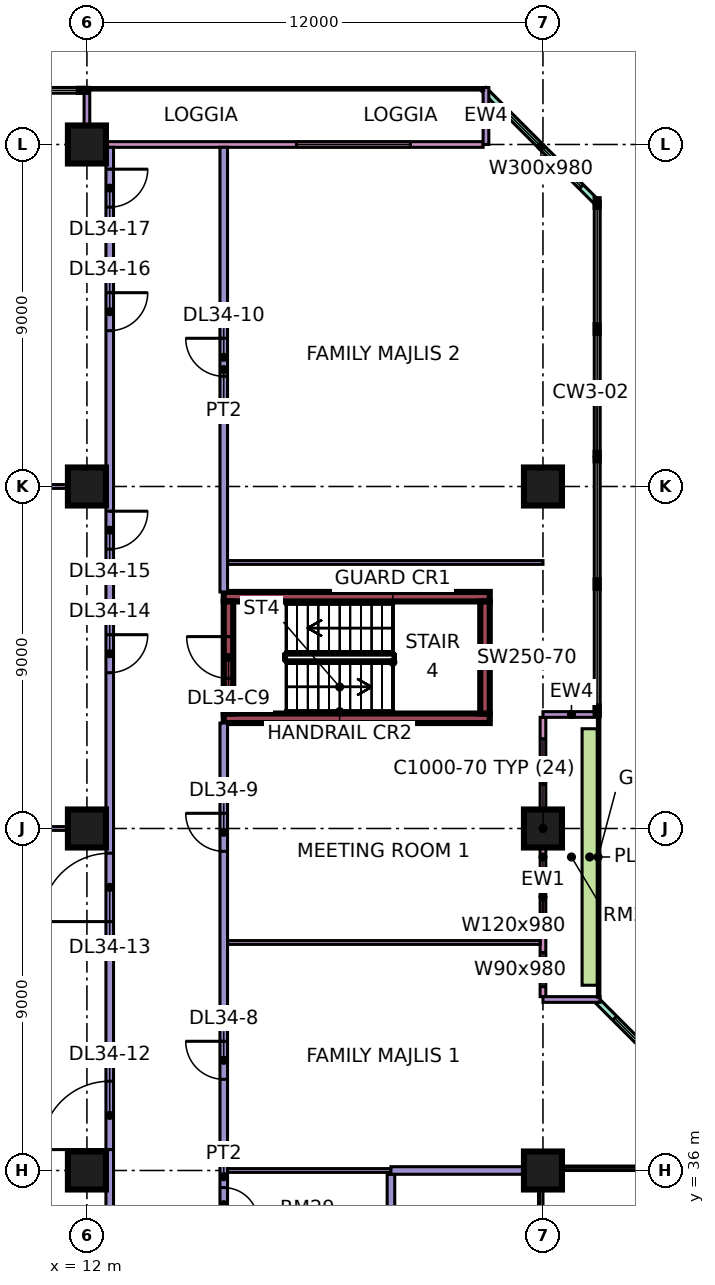
"""IFC4 building model, lengths in metres.
Left out: names, types, materials, properties, quantities, classifications, styles, units other than length and angle.
Written with IfcOpenShell. Run it as: python <this file> out.ifc"""

import sys

from ifc_helpers import new_model, si_unit, direction, frame, frame_2d, origin, origin_2d, place, context, subcontext, project, spatial, rectangle, extrude, element, fill, save


model = new_model("IFC4")
c1 = context("Model", 3, precision=1e-05, world=origin(), true_north=direction((0.0, 1.0)))
c2 = subcontext(c1, "Body", "Model", "MODEL_VIEW")
j1 = project(units=[si_unit("LENGTHUNIT", "METRE"), si_unit("PLANEANGLEUNIT", "RADIAN")], contexts=[c1])
p1 = place(None, origin())
s1 = spatial("IfcSite", under=j1, at=p1, CompositionType="ELEMENT")
p2 = place(p1, origin())
s2 = spatial("IfcBuilding", under=s1, at=p2, CompositionType="ELEMENT")
p3 = place(p2, frame((0.0, 0.0, 146.15)))
s3 = spatial("IfcBuildingStorey", under=s2, at=p3, CompositionType="ELEMENT", Elevation=146.15)
for number, where, z_axis, x_axis in (
    (1, (12.0, 36.0, 0.0), (0.0, 0.0, 1.0), (1.0, 0.0, 0.0)),
    (2, (12.0, 45.0, 0.0), (0.0, 0.0, 1.0), (1.0, 0.0, 0.0)),
    (3, (12.0, 54.0, 0.0), (0.0, 0.0, 1.0), (1.0, 0.0, 0.0)),
    (4, (12.0, 63.0, 0.0), (0.0, 0.0, 1.0), (1.0, 0.0, 0.0)),
    (5, (24.0, 36.0, 0.0), (0.0, 0.0, 1.0), (1.0, 0.0, 0.0)),
    (6, (24.0, 45.0, 0.0), (0.0, 0.0, 1.0), (1.0, 0.0, 0.0)),
    (7, (24.0, 54.0, 0.0), (0.0, 0.0, 1.0), (1.0, 0.0, 0.0)),
):
    element("IfcColumn", number, at=place(p3, frame(where, z_axis=z_axis, x_axis=x_axis)), inside=s3, PredefinedType="COLUMN", context=c2, shape_type="SweptSolid", body=[
        extrude(rectangle(XDim=1.0, YDim=1.0, at=origin_2d()), origin(), (0.0, 0.0, 1.0), 11.25),
    ])
for number, where, z_axis, x_axis in (
    (8, (15.6, 47.9, 0.0), (0.0, 0.0, 1.0), (1.0, 0.0, 0.0)),
    (9, (15.6, 51.1, 0.0), (0.0, 0.0, 1.0), (1.0, 0.0, 0.0)),
):
    element("IfcWall", number, at=place(p3, frame(where, z_axis=z_axis, x_axis=x_axis)), inside=s3, PredefinedType="SHEAR", context=c2, shape_type="SweptSolid", body=[
        extrude(rectangle(XDim=7.0, YDim=0.25, at=frame_2d((3.5, 0.0))), origin(), (0.0, 0.0, 1.0), 11.25),
    ])
p4 = place(p3, frame((15.725, 48.025, 0.0), z_axis=(0.0, 0.0, 1.0), x_axis=(0.0, 1.0, 0.0)))
e10 = element("IfcWall", 10, at=p4, inside=s3, PredefinedType="SHEAR", context=c2, shape_type="SweptSolid", body=[
    extrude(rectangle(XDim=2.95, YDim=0.25, at=frame_2d((1.475, 0.0))), origin(), (0.0, 0.0, 1.0), 11.25),
])
p5 = place(p4, frame((0.925, 0.0, 0.0)))
e11 = element("IfcOpeningElement", 11, at=p5, cuts=e10, PredefinedType="OPENING", context=c2, shape_type="SweptSolid", body=[
    extrude(rectangle(XDim=1.1, YDim=2.2, at=frame_2d((0.55, 1.1))), frame((0.0, 0.135, 0.0), z_axis=(0.0, -1.0, 0.0), x_axis=(1.0, 0.0, 0.0)), (0.0, 0.0, 1.0), 0.27),
])
p6 = place(p3, frame((22.475, 48.025, 0.0), z_axis=(0.0, 0.0, 1.0), x_axis=(0.0, 1.0, 0.0)))
e12 = element("IfcWall", 12, at=p6, inside=s3, PredefinedType="SHEAR", context=c2, shape_type="SweptSolid", body=[
    extrude(rectangle(XDim=2.95, YDim=0.25, at=frame_2d((1.475, 0.0))), origin(), (0.0, 0.0, 1.0), 11.25),
])
p7 = place(p3, frame((28.447, 37.447, 0.0), z_axis=(0.0, 0.0, 1.0), x_axis=(-0.707106781187, 0.707106781187, 0.0)))
e13 = element("IfcWall", 13, at=p7, inside=s3, PredefinedType="SOLIDWALL", context=c2, shape_type="SweptSolid", body=[
    extrude(rectangle(XDim=4.243, YDim=0.15, at=frame_2d((2.121, 0.0))), origin(), (0.0, 0.0, 1.0), 10.85),
])
p8 = place(p7, frame((0.621, 0.0, 0.45)))
e14 = element("IfcOpeningElement", 14, at=p8, cuts=e13, PredefinedType="OPENING", context=c2, shape_type="SweptSolid", body=[
    extrude(rectangle(XDim=3.0, YDim=9.8, at=frame_2d((1.5, 4.9))), frame((0.0, 0.085, 0.0), z_axis=(0.0, -1.0, 0.0), x_axis=(1.0, 0.0, 0.0)), (0.0, 0.0, 1.0), 0.17),
])
p9 = place(p3, frame((24.0, 40.575, 0.0), z_axis=(0.0, 0.0, 1.0), x_axis=(0.0, 1.0, 0.0)))
e15 = element("IfcWall", 15, at=p9, inside=s3, PredefinedType="SOLIDWALL", context=c2, shape_type="SweptSolid", body=[
    extrude(rectangle(XDim=7.35, YDim=0.15, at=frame_2d((3.675, 0.0))), origin(), (0.0, 0.0, 1.0), 10.85),
])
p10 = place(p9, frame((0.262, 0.0, 0.45)))
e16 = element("IfcOpeningElement", 16, at=p10, cuts=e15, PredefinedType="OPENING", context=c2, shape_type="SweptSolid", body=[
    extrude(rectangle(XDim=0.9, YDim=9.8, at=frame_2d((0.45, 4.9))), frame((0.0, 0.085, 0.0), z_axis=(0.0, -1.0, 0.0), x_axis=(1.0, 0.0, 0.0)), (0.0, 0.0, 1.0), 0.17),
])
p11 = place(p9, frame((2.025, 0.0, 0.45)))
e17 = element("IfcOpeningElement", 17, at=p11, cuts=e15, PredefinedType="OPENING", context=c2, shape_type="SweptSolid", body=[
    extrude(rectangle(XDim=1.2, YDim=9.8, at=frame_2d((0.6, 4.9))), frame((0.0, 0.085, 0.0), z_axis=(0.0, -1.0, 0.0), x_axis=(1.0, 0.0, 0.0)), (0.0, 0.0, 1.0), 0.17),
])
p12 = place(p9, frame((5.587, 0.0, 0.45)))
e18 = element("IfcOpeningElement", 18, at=p12, cuts=e15, PredefinedType="OPENING", context=c2, shape_type="SweptSolid", body=[
    extrude(rectangle(XDim=1.2, YDim=9.8, at=frame_2d((0.6, 4.9))), frame((0.0, 0.085, 0.0), z_axis=(0.0, -1.0, 0.0), x_axis=(1.0, 0.0, 0.0)), (0.0, 0.0, 1.0), 0.17),
])
for number, where, z_axis, x_axis in (
    (19, (25.5, 40.5, 0.0), (0.0, 0.0, 1.0), (-1.0, 0.0, 0.0)),
    (20, (25.5, 48.0, 0.0), (0.0, 0.0, 1.0), (-1.0, 0.0, 0.0)),
):
    element("IfcWall", number, at=place(p3, frame(where, z_axis=z_axis, x_axis=x_axis)), inside=s3, PredefinedType="SOLIDWALL", context=c2, shape_type="SweptSolid", body=[
        extrude(rectangle(XDim=1.5, YDim=0.15, at=frame_2d((0.75, 0.0))), origin(), (0.0, 0.0, 1.0), 10.85),
    ])
p13 = place(p3, frame((25.447, 61.447, 0.0), z_axis=(0.0, 0.0, 1.0), x_axis=(-0.707106781187, 0.707106781187, 0.0)))
e21 = element("IfcWall", 21, at=p13, inside=s3, PredefinedType="SOLIDWALL", context=c2, shape_type="SweptSolid", body=[
    extrude(rectangle(XDim=4.243, YDim=0.15, at=frame_2d((2.121, 0.0))), origin(), (0.0, 0.0, 1.0), 10.85),
])
p14 = place(p13, frame((0.621, 0.0, 0.45)))
e22 = element("IfcOpeningElement", 22, at=p14, cuts=e21, PredefinedType="OPENING", context=c2, shape_type="SweptSolid", body=[
    extrude(rectangle(XDim=3.0, YDim=9.8, at=frame_2d((1.5, 4.9))), frame((0.0, 0.085, 0.0), z_axis=(0.0, -1.0, 0.0), x_axis=(1.0, 0.0, 0.0)), (0.0, 0.0, 1.0), 0.17),
])
p15 = place(p3, frame((22.425, 63.0, 0.0), z_axis=(0.0, 0.0, 1.0), x_axis=(-1.0, 0.0, 0.0)))
e23 = element("IfcWall", 23, at=p15, inside=s3, PredefinedType="SOLIDWALL", context=c2, shape_type="SweptSolid", body=[
    extrude(rectangle(XDim=10.35, YDim=0.15, at=frame_2d((5.175, 0.0))), origin(), (0.0, 0.0, 1.0), 10.85),
])
p16 = place(p15, frame((1.913, 0.0, 0.45)))
e24 = element("IfcOpeningElement", 24, at=p16, cuts=e23, PredefinedType="OPENING", context=c2, shape_type="SweptSolid", body=[
    extrude(rectangle(XDim=3.0, YDim=9.8, at=frame_2d((1.5, 4.9))), frame((0.0, 0.085, 0.0), z_axis=(0.0, -1.0, 0.0), x_axis=(1.0, 0.0, 0.0)), (0.0, 0.0, 1.0), 0.17),
])
for number, where, z_axis, x_axis in (
    (25, (22.5, 64.5, 0.0), (0.0, 0.0, 1.0), (0.0, -1.0, 0.0)),
    (26, (12.0, 64.5, 0.0), (0.0, 0.0, 1.0), (0.0, -1.0, 0.0)),
):
    element("IfcWall", number, at=place(p3, frame(where, z_axis=z_axis, x_axis=x_axis)), inside=s3, PredefinedType="SOLIDWALL", context=c2, shape_type="SweptSolid", body=[
        extrude(rectangle(XDim=1.5, YDim=0.15, at=frame_2d((0.75, 0.0))), origin(), (0.0, 0.0, 1.0), 10.85),
    ])
p17 = place(p3, frame((25.229, 40.875, 0.0), z_axis=(0.0, 0.0, 1.0), x_axis=(0.0, 1.0, 0.0)))
e27 = element("IfcWall", 27, at=p17, inside=s3, PredefinedType="SOLIDWALL", context=c2, shape_type="SweptSolid", body=[
    extrude(rectangle(XDim=6.75, YDim=0.4, at=frame_2d((3.375, 0.0))), origin(), (0.0, 0.0, 1.0), 0.7),
])
p18 = place(p3, frame((0.0, 54.0, 0.0), z_axis=(0.0, 0.0, 1.0), x_axis=(1.0, 0.0, 0.0)))
e28 = element("IfcWall", 28, at=p18, inside=s3, PredefinedType="PARTITIONING", context=c2, shape_type="SweptSolid", body=[
    extrude(rectangle(XDim=12.5, YDim=0.1, at=frame_2d((6.25, 0.0))), origin(), (0.0, 0.0, 1.0), 10.85),
])
p19 = place(p3, frame((0.074, 45.0, 0.0), z_axis=(0.0, 0.0, 1.0), x_axis=(1.0, 0.0, 0.0)))
e29 = element("IfcWall", 29, at=p19, inside=s3, PredefinedType="PARTITIONING", context=c2, shape_type="SweptSolid", body=[
    extrude(rectangle(XDim=12.426, YDim=0.1, at=frame_2d((6.213, 0.0))), origin(), (0.0, 0.0, 1.0), 10.85),
])
p20 = place(p3, frame((12.6, 22.9, 0.0), z_axis=(0.0, 0.0, 1.0), x_axis=(0.0, 1.0, 0.0)))
e30 = element("IfcWall", 30, at=p20, inside=s3, PredefinedType="PARTITIONING", context=c2, shape_type="SweptSolid", body=[
    extrude(rectangle(XDim=40.026, YDim=0.2, at=frame_2d((20.013, 0.0))), origin(), (0.0, 0.0, 1.0), 10.85),
])
p21 = place(p20, frame((13.65, 0.0, 0.0)))
e31 = element("IfcOpeningElement", 31, at=p21, cuts=e30, PredefinedType="OPENING", context=c2, shape_type="SweptSolid", body=[
    extrude(rectangle(XDim=1.8, YDim=2.1, at=frame_2d((0.9, 1.05))), frame((0.0, 0.11, 0.0), z_axis=(0.0, -1.0, 0.0), x_axis=(1.0, 0.0, 0.0)), (0.0, 0.0, 1.0), 0.22),
])
p22 = place(p20, frame((19.65, 0.0, 0.0)))
e32 = element("IfcOpeningElement", 32, at=p22, cuts=e30, PredefinedType="OPENING", context=c2, shape_type="SweptSolid", body=[
    extrude(rectangle(XDim=1.8, YDim=2.1, at=frame_2d((0.9, 1.05))), frame((0.0, 0.11, 0.0), z_axis=(0.0, -1.0, 0.0), x_axis=(1.0, 0.0, 0.0)), (0.0, 0.0, 1.0), 0.22),
])
p23 = place(p20, frame((26.2, 0.0, 0.0)))
e33 = element("IfcOpeningElement", 33, at=p23, cuts=e30, PredefinedType="OPENING", context=c2, shape_type="SweptSolid", body=[
    extrude(rectangle(XDim=1.0, YDim=2.1, at=frame_2d((0.5, 1.05))), frame((0.0, 0.11, 0.0), z_axis=(0.0, -1.0, 0.0), x_axis=(1.0, 0.0, 0.0)), (0.0, 0.0, 1.0), 0.22),
])
p24 = place(p20, frame((29.45, 0.0, 0.0)))
e34 = element("IfcOpeningElement", 34, at=p24, cuts=e30, PredefinedType="OPENING", context=c2, shape_type="SweptSolid", body=[
    extrude(rectangle(XDim=1.0, YDim=2.1, at=frame_2d((0.5, 1.05))), frame((0.0, 0.11, 0.0), z_axis=(0.0, -1.0, 0.0), x_axis=(1.0, 0.0, 0.0)), (0.0, 0.0, 1.0), 0.22),
])
p25 = place(p20, frame((35.2, 0.0, 0.0)))
e35 = element("IfcOpeningElement", 35, at=p25, cuts=e30, PredefinedType="OPENING", context=c2, shape_type="SweptSolid", body=[
    extrude(rectangle(XDim=1.0, YDim=2.1, at=frame_2d((0.5, 1.05))), frame((0.0, 0.11, 0.0), z_axis=(0.0, -1.0, 0.0), x_axis=(1.0, 0.0, 0.0)), (0.0, 0.0, 1.0), 0.22),
])
p26 = place(p20, frame((38.45, 0.0, 0.0)))
e36 = element("IfcOpeningElement", 36, at=p26, cuts=e30, PredefinedType="OPENING", context=c2, shape_type="SweptSolid", body=[
    extrude(rectangle(XDim=1.0, YDim=2.1, at=frame_2d((0.5, 1.05))), frame((0.0, 0.11, 0.0), z_axis=(0.0, -1.0, 0.0), x_axis=(1.0, 0.0, 0.0)), (0.0, 0.0, 1.0), 0.22),
])
p27 = place(p3, frame((15.6, 23.9, 0.0), z_axis=(0.0, 0.0, 1.0), x_axis=(0.0, 1.0, 0.0)))
e37 = element("IfcWall", 37, at=p27, inside=s3, PredefinedType="PARTITIONING", context=c2, shape_type="SweptSolid", body=[
    extrude(rectangle(XDim=23.875, YDim=0.2, at=frame_2d((11.938, 0.0))), origin(), (0.0, 0.0, 1.0), 10.85),
])
p28 = place(p27, frame((14.5, 0.0, 0.0)))
e38 = element("IfcOpeningElement", 38, at=p28, cuts=e37, PredefinedType="OPENING", context=c2, shape_type="SweptSolid", body=[
    extrude(rectangle(XDim=1.0, YDim=2.1, at=frame_2d((0.5, 1.05))), frame((0.0, 0.11, 0.0), z_axis=(0.0, -1.0, 0.0), x_axis=(1.0, 0.0, 0.0)), (0.0, 0.0, 1.0), 0.22),
])
p29 = place(p27, frame((20.5, 0.0, 0.0)))
e39 = element("IfcOpeningElement", 39, at=p29, cuts=e37, PredefinedType="OPENING", context=c2, shape_type="SweptSolid", body=[
    extrude(rectangle(XDim=1.0, YDim=2.1, at=frame_2d((0.5, 1.05))), frame((0.0, 0.11, 0.0), z_axis=(0.0, -1.0, 0.0), x_axis=(1.0, 0.0, 0.0)), (0.0, 0.0, 1.0), 0.22),
])
p30 = place(p27, frame((10.75, 0.0, 0.0)))
e40 = element("IfcOpeningElement", 40, at=p30, cuts=e37, PredefinedType="OPENING", context=c2, shape_type="SweptSolid", body=[
    extrude(rectangle(XDim=0.9, YDim=2.1, at=frame_2d((0.45, 1.05))), frame((0.0, 0.11, 0.0), z_axis=(0.0, -1.0, 0.0), x_axis=(1.0, 0.0, 0.0)), (0.0, 0.0, 1.0), 0.22),
])
p31 = place(p27, frame((7.5, 0.0, 0.0)))
e41 = element("IfcOpeningElement", 41, at=p31, cuts=e37, PredefinedType="OPENING", context=c2, shape_type="SweptSolid", body=[
    extrude(rectangle(XDim=0.9, YDim=2.1, at=frame_2d((0.45, 1.05))), frame((0.0, 0.11, 0.0), z_axis=(0.0, -1.0, 0.0), x_axis=(1.0, 0.0, 0.0)), (0.0, 0.0, 1.0), 0.22),
])
p32 = place(p27, frame((2.5, 0.0, 0.0)))
e42 = element("IfcOpeningElement", 42, at=p32, cuts=e37, PredefinedType="OPENING", context=c2, shape_type="SweptSolid", body=[
    extrude(rectangle(XDim=0.9, YDim=2.1, at=frame_2d((0.45, 1.05))), frame((0.0, 0.11, 0.0), z_axis=(0.0, -1.0, 0.0), x_axis=(1.0, 0.0, 0.0)), (0.0, 0.0, 1.0), 0.22),
])
p33 = place(p3, frame((15.6, 51.225, 0.0), z_axis=(0.0, 0.0, 1.0), x_axis=(0.0, 1.0, 0.0)))
e43 = element("IfcWall", 43, at=p33, inside=s3, PredefinedType="PARTITIONING", context=c2, shape_type="SweptSolid", body=[
    extrude(rectangle(XDim=11.701, YDim=0.2, at=frame_2d((5.851, 0.0))), origin(), (0.0, 0.0, 1.0), 10.85),
])
p34 = place(p33, frame((5.675, 0.0, 0.0)))
e44 = element("IfcOpeningElement", 44, at=p34, cuts=e43, PredefinedType="OPENING", context=c2, shape_type="SweptSolid", body=[
    extrude(rectangle(XDim=1.0, YDim=2.1, at=frame_2d((0.5, 1.05))), frame((0.0, 0.11, 0.0), z_axis=(0.0, -1.0, 0.0), x_axis=(1.0, 0.0, 0.0)), (0.0, 0.0, 1.0), 0.22),
])
p35 = place(p3, frame((15.7, 36.0, 0.0), z_axis=(0.0, 0.0, 1.0), x_axis=(1.0, 0.0, 0.0)))
e45 = element("IfcWall", 45, at=p35, inside=s3, PredefinedType="PARTITIONING", context=c2, shape_type="SweptSolid", body=[
    extrude(rectangle(XDim=4.3, YDim=0.1, at=frame_2d((2.15, 0.0))), origin(), (0.0, 0.0, 1.0), 10.85),
])
p36 = place(p3, frame((15.7, 42.0, 0.0), z_axis=(0.0, 0.0, 1.0), x_axis=(1.0, 0.0, 0.0)))
e46 = element("IfcWall", 46, at=p36, inside=s3, PredefinedType="PARTITIONING", context=c2, shape_type="SweptSolid", body=[
    extrude(rectangle(XDim=8.226, YDim=0.1, at=frame_2d((4.113, 0.0))), origin(), (0.0, 0.0, 1.0), 10.85),
])
p37 = place(p3, frame((15.7, 52.0, 0.0), z_axis=(0.0, 0.0, 1.0), x_axis=(1.0, 0.0, 0.0)))
e47 = element("IfcWall", 47, at=p37, inside=s3, PredefinedType="PARTITIONING", context=c2, shape_type="SweptSolid", body=[
    extrude(rectangle(XDim=8.3, YDim=0.1, at=frame_2d((4.15, 0.0))), origin(), (0.0, 0.0, 1.0), 10.85),
])
p38 = place(p3, frame((20.0, 23.9, 0.0), z_axis=(0.0, 0.0, 1.0), x_axis=(0.0, 1.0, 0.0)))
e48 = element("IfcWall", 48, at=p38, inside=s3, PredefinedType="PARTITIONING", context=c2, shape_type="SweptSolid", body=[
    extrude(rectangle(XDim=12.0, YDim=0.2, at=frame_2d((6.0, 0.0))), origin(), (0.0, 0.0, 1.0), 10.85),
])
p39 = place(p3, frame((20.0, 36.0, 0.0), z_axis=(0.0, 0.0, 1.0), x_axis=(1.0, 0.0, 0.0)))
e49 = element("IfcWall", 49, at=p39, inside=s3, PredefinedType="PARTITIONING", context=c2, shape_type="SweptSolid", body=[
    extrude(rectangle(XDim=4.0, YDim=0.2, at=frame_2d((2.0, 0.0))), origin(), (0.0, 0.0, 1.0), 10.85),
])
p40 = place(p8, origin())
e50 = element("IfcWindow", 50, at=p40, inside=s3, PartitioningType="SINGLE_PANEL", PredefinedType="WINDOW", context=c2, shape_type="SweptSolid", body=[
    extrude(rectangle(XDim=3.0, YDim=9.8, at=frame_2d((1.5, 4.9))), frame((0.0, 0.03, 0.0), z_axis=(0.0, -1.0, 0.0), x_axis=(1.0, 0.0, 0.0)), (0.0, 0.0, 1.0), 0.06),
])
fill(e14, e50)
p41 = place(p10, origin())
e51 = element("IfcWindow", 51, at=p41, inside=s3, PartitioningType="SINGLE_PANEL", PredefinedType="WINDOW", context=c2, shape_type="SweptSolid", body=[
    extrude(rectangle(XDim=0.9, YDim=9.8, at=frame_2d((0.45, 4.9))), frame((0.0, 0.03, 0.0), z_axis=(0.0, -1.0, 0.0), x_axis=(1.0, 0.0, 0.0)), (0.0, 0.0, 1.0), 0.06),
])
fill(e16, e51)
p42 = place(p11, origin())
e52 = element("IfcWindow", 52, at=p42, inside=s3, PartitioningType="SINGLE_PANEL", PredefinedType="WINDOW", context=c2, shape_type="SweptSolid", body=[
    extrude(rectangle(XDim=1.2, YDim=9.8, at=frame_2d((0.6, 4.9))), frame((0.0, 0.03, 0.0), z_axis=(0.0, -1.0, 0.0), x_axis=(1.0, 0.0, 0.0)), (0.0, 0.0, 1.0), 0.06),
])
fill(e17, e52)
p43 = place(p12, origin())
e53 = element("IfcWindow", 53, at=p43, inside=s3, PartitioningType="SINGLE_PANEL", PredefinedType="WINDOW", context=c2, shape_type="SweptSolid", body=[
    extrude(rectangle(XDim=1.2, YDim=9.8, at=frame_2d((0.6, 4.9))), frame((0.0, 0.03, 0.0), z_axis=(0.0, -1.0, 0.0), x_axis=(1.0, 0.0, 0.0)), (0.0, 0.0, 1.0), 0.06),
])
fill(e18, e53)
p44 = place(p14, origin())
e54 = element("IfcWindow", 54, at=p44, inside=s3, PartitioningType="SINGLE_PANEL", PredefinedType="WINDOW", context=c2, shape_type="SweptSolid", body=[
    extrude(rectangle(XDim=3.0, YDim=9.8, at=frame_2d((1.5, 4.9))), frame((0.0, 0.03, 0.0), z_axis=(0.0, -1.0, 0.0), x_axis=(1.0, 0.0, 0.0)), (0.0, 0.0, 1.0), 0.06),
])
fill(e22, e54)
p45 = place(p16, origin())
e55 = element("IfcWindow", 55, at=p45, inside=s3, PartitioningType="SINGLE_PANEL", PredefinedType="WINDOW", context=c2, shape_type="SweptSolid", body=[
    extrude(rectangle(XDim=3.0, YDim=9.8, at=frame_2d((1.5, 4.9))), frame((0.0, 0.03, 0.0), z_axis=(0.0, -1.0, 0.0), x_axis=(1.0, 0.0, 0.0)), (0.0, 0.0, 1.0), 0.06),
])
fill(e24, e55)
p46 = place(p5, frame((1.1, 0.0, 0.0), z_axis=(0.0, 0.0, 1.0), x_axis=(-1.0, 0.0, 0.0)))
e56 = element("IfcDoor", 56, at=p46, inside=s3, OperationType="SINGLE_SWING_RIGHT", PredefinedType="DOOR", context=c2, shape_type="SweptSolid", body=[
    extrude(rectangle(XDim=1.1, YDim=2.2, at=frame_2d((0.55, 1.1))), frame((0.0, 0.025, 0.0), z_axis=(0.0, -1.0, 0.0), x_axis=(1.0, 0.0, 0.0)), (0.0, 0.0, 1.0), 0.05),
])
fill(e11, e56)
p47 = place(p28, frame((1.0, 0.0, 0.0), z_axis=(0.0, 0.0, 1.0), x_axis=(-1.0, 0.0, 0.0)))
e57 = element("IfcDoor", 57, at=p47, inside=s3, OperationType="SINGLE_SWING_RIGHT", PredefinedType="DOOR", context=c2, shape_type="SweptSolid", body=[
    extrude(rectangle(XDim=1.0, YDim=2.1, at=frame_2d((0.5, 1.05))), frame((0.0, 0.025, 0.0), z_axis=(0.0, -1.0, 0.0), x_axis=(1.0, 0.0, 0.0)), (0.0, 0.0, 1.0), 0.05),
])
fill(e38, e57)
p48 = place(p29, frame((1.0, 0.0, 0.0), z_axis=(0.0, 0.0, 1.0), x_axis=(-1.0, 0.0, 0.0)))
e58 = element("IfcDoor", 58, at=p48, inside=s3, OperationType="SINGLE_SWING_RIGHT", PredefinedType="DOOR", context=c2, shape_type="SweptSolid", body=[
    extrude(rectangle(XDim=1.0, YDim=2.1, at=frame_2d((0.5, 1.05))), frame((0.0, 0.025, 0.0), z_axis=(0.0, -1.0, 0.0), x_axis=(1.0, 0.0, 0.0)), (0.0, 0.0, 1.0), 0.05),
])
fill(e39, e58)
p49 = place(p34, frame((1.0, 0.0, 0.0), z_axis=(0.0, 0.0, 1.0), x_axis=(-1.0, 0.0, 0.0)))
e59 = element("IfcDoor", 59, at=p49, inside=s3, OperationType="SINGLE_SWING_RIGHT", PredefinedType="DOOR", context=c2, shape_type="SweptSolid", body=[
    extrude(rectangle(XDim=1.0, YDim=2.1, at=frame_2d((0.5, 1.05))), frame((0.0, 0.025, 0.0), z_axis=(0.0, -1.0, 0.0), x_axis=(1.0, 0.0, 0.0)), (0.0, 0.0, 1.0), 0.05),
])
fill(e44, e59)
p50 = place(p21, origin())
e60 = element("IfcDoor", 60, at=p50, inside=s3, OperationType="DOUBLE_DOOR_SINGLE_SWING", PredefinedType="DOOR", context=c2, shape_type="SweptSolid", body=[
    extrude(rectangle(XDim=1.8, YDim=2.1, at=frame_2d((0.9, 1.05))), frame((0.0, 0.025, 0.0), z_axis=(0.0, -1.0, 0.0), x_axis=(1.0, 0.0, 0.0)), (0.0, 0.0, 1.0), 0.05),
])
fill(e31, e60)
p51 = place(p22, origin())
e61 = element("IfcDoor", 61, at=p51, inside=s3, OperationType="DOUBLE_DOOR_SINGLE_SWING", PredefinedType="DOOR", context=c2, shape_type="SweptSolid", body=[
    extrude(rectangle(XDim=1.8, YDim=2.1, at=frame_2d((0.9, 1.05))), frame((0.0, 0.025, 0.0), z_axis=(0.0, -1.0, 0.0), x_axis=(1.0, 0.0, 0.0)), (0.0, 0.0, 1.0), 0.05),
])
fill(e32, e61)
p52 = place(p23, origin())
e62 = element("IfcDoor", 62, at=p52, inside=s3, OperationType="SINGLE_SWING_RIGHT", PredefinedType="DOOR", context=c2, shape_type="SweptSolid", body=[
    extrude(rectangle(XDim=1.0, YDim=2.1, at=frame_2d((0.5, 1.05))), frame((0.0, 0.025, 0.0), z_axis=(0.0, -1.0, 0.0), x_axis=(1.0, 0.0, 0.0)), (0.0, 0.0, 1.0), 0.05),
])
fill(e33, e62)
p53 = place(p24, origin())
e63 = element("IfcDoor", 63, at=p53, inside=s3, OperationType="SINGLE_SWING_RIGHT", PredefinedType="DOOR", context=c2, shape_type="SweptSolid", body=[
    extrude(rectangle(XDim=1.0, YDim=2.1, at=frame_2d((0.5, 1.05))), frame((0.0, 0.025, 0.0), z_axis=(0.0, -1.0, 0.0), x_axis=(1.0, 0.0, 0.0)), (0.0, 0.0, 1.0), 0.05),
])
fill(e34, e63)
p54 = place(p25, origin())
e64 = element("IfcDoor", 64, at=p54, inside=s3, OperationType="SINGLE_SWING_RIGHT", PredefinedType="DOOR", context=c2, shape_type="SweptSolid", body=[
    extrude(rectangle(XDim=1.0, YDim=2.1, at=frame_2d((0.5, 1.05))), frame((0.0, 0.025, 0.0), z_axis=(0.0, -1.0, 0.0), x_axis=(1.0, 0.0, 0.0)), (0.0, 0.0, 1.0), 0.05),
])
fill(e35, e64)
p55 = place(p26, origin())
e65 = element("IfcDoor", 65, at=p55, inside=s3, OperationType="SINGLE_SWING_RIGHT", PredefinedType="DOOR", context=c2, shape_type="SweptSolid", body=[
    extrude(rectangle(XDim=1.0, YDim=2.1, at=frame_2d((0.5, 1.05))), frame((0.0, 0.025, 0.0), z_axis=(0.0, -1.0, 0.0), x_axis=(1.0, 0.0, 0.0)), (0.0, 0.0, 1.0), 0.05),
])
fill(e36, e65)
p56 = place(p30, frame((0.9, 0.0, 0.0), z_axis=(0.0, 0.0, 1.0), x_axis=(-1.0, 0.0, 0.0)))
e66 = element("IfcDoor", 66, at=p56, inside=s3, OperationType="SINGLE_SWING_LEFT", PredefinedType="DOOR", context=c2, shape_type="SweptSolid", body=[
    extrude(rectangle(XDim=0.9, YDim=2.1, at=frame_2d((0.45, 1.05))), frame((0.0, 0.025, 0.0), z_axis=(0.0, -1.0, 0.0), x_axis=(1.0, 0.0, 0.0)), (0.0, 0.0, 1.0), 0.05),
])
fill(e40, e66)
save(model, sys.argv[1])
